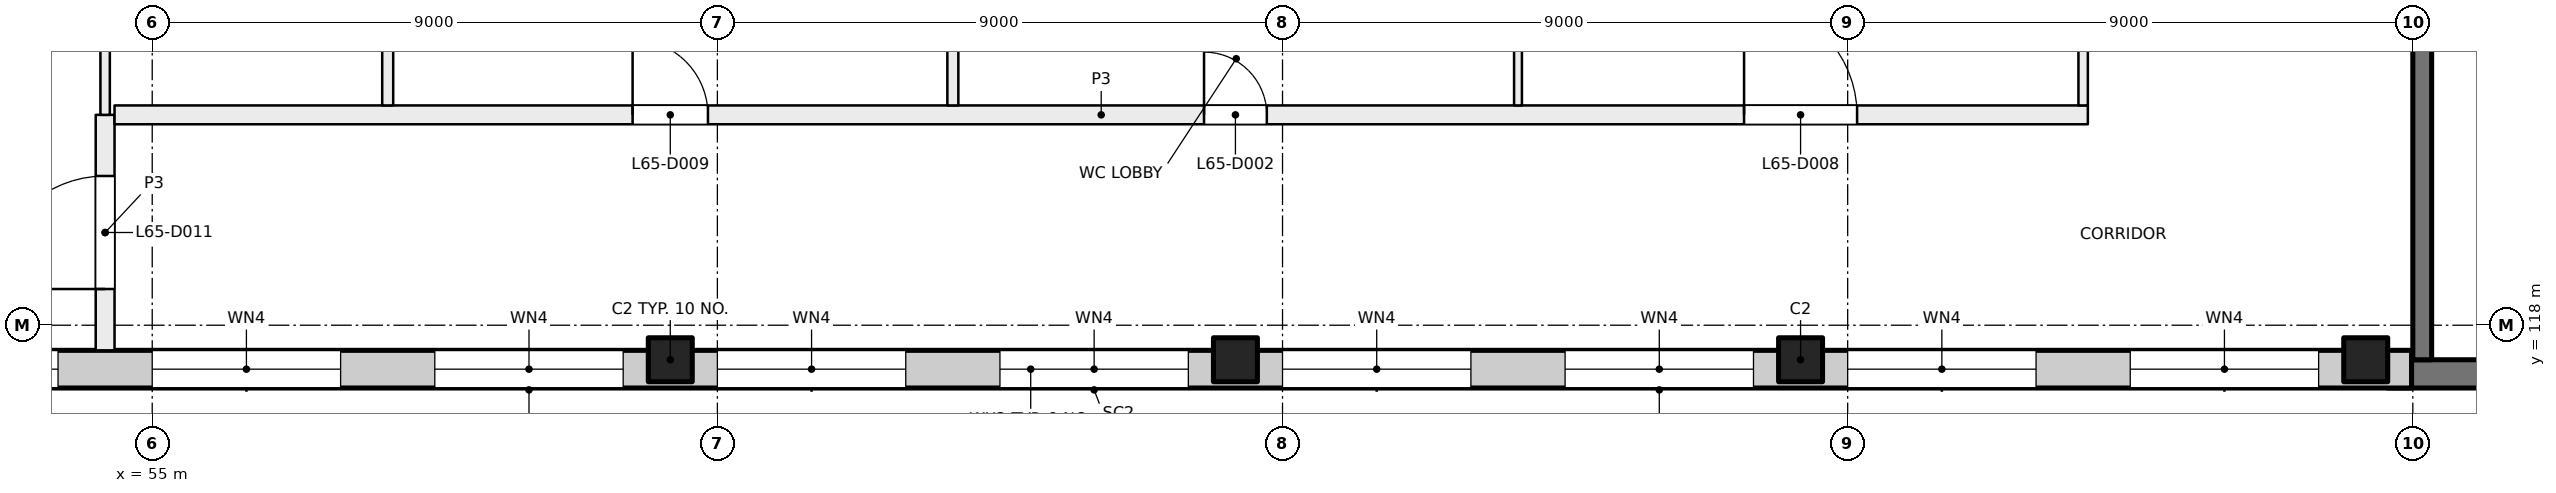
"""IFC4 building model, lengths in metres.
Left out: names, types, materials, properties, quantities, classifications, styles, units other than length and angle.
Written with IfcOpenShell. Run it as: python <this file> out.ifc"""

import sys

from ifc_helpers import new_model, si_unit, direction, frame, frame_2d, origin, origin_2d, place, context, subcontext, project, spatial, rectangle, extrude, element, fill, save


model = new_model("IFC4")
c1 = context("Model", 3, precision=1e-05, world=origin(), true_north=direction((0.0, 1.0)))
c2 = subcontext(c1, "Body", "Model", "MODEL_VIEW")
j1 = project(units=[si_unit("LENGTHUNIT", "METRE"), si_unit("PLANEANGLEUNIT", "RADIAN")], contexts=[c1])
p1 = place(None, origin())
s1 = spatial("IfcSite", under=j1, at=p1, CompositionType="ELEMENT")
p2 = place(p1, origin())
s2 = spatial("IfcBuilding", under=s1, at=p2, CompositionType="ELEMENT")
p3 = place(p2, frame((0.0, 0.0, 273.5)))
s3 = spatial("IfcBuildingStorey", under=s2, at=p3, CompositionType="ELEMENT", Elevation=273.5)
for number, where, z_axis, x_axis in (
    (1, (63.25, 117.45, 0.0), (0.0, 0.0, 1.0), (1.0, 0.0, 0.0)),
    (2, (72.25, 117.45, 0.0), (0.0, 0.0, 1.0), (1.0, 0.0, 0.0)),
    (3, (81.25, 117.45, 0.0), (0.0, 0.0, 1.0), (1.0, 0.0, 0.0)),
    (4, (90.25, 117.45, 0.0), (0.0, 0.0, 1.0), (1.0, 0.0, 0.0)),
):
    element("IfcColumn", number, at=place(p3, frame(where, z_axis=z_axis, x_axis=x_axis)), inside=s3, PredefinedType="COLUMN", context=c2, shape_type="SweptSolid", body=[
        extrude(rectangle(XDim=0.7, YDim=0.7, at=origin_2d()), origin(), (0.0, 0.0, 1.0), 4.0),
    ])
p4 = place(p3, frame((99.6, 117.225, 0.0), z_axis=(0.0, 0.0, 1.0), x_axis=(-1.0, 0.0, 0.0)))
e5 = element("IfcWall", 5, at=p4, inside=s3, PredefinedType="SHEAR", context=c2, shape_type="SweptSolid", body=[
    extrude(rectangle(XDim=9.0, YDim=0.45, at=frame_2d((4.5, 0.0))), origin(), (0.0, 0.0, 1.0), 4.0),
])
p5 = place(p3, frame((91.15, 126.2, 0.0), z_axis=(0.0, 0.0, 1.0), x_axis=(0.0, -1.0, 0.0)))
e6 = element("IfcWall", 6, at=p5, inside=s3, PredefinedType="SHEAR", context=c2, shape_type="SweptSolid", body=[
    extrude(rectangle(XDim=8.75, YDim=0.3, at=frame_2d((4.375, 0.0))), origin(), (0.0, 0.0, 1.0), 4.0),
])
p6 = place(p3, frame((90.98, 117.3, 0.0), z_axis=(0.0, 0.0, 1.0), x_axis=(-1.0, 0.0, 0.0)))
e7 = element("IfcWall", 7, at=p6, inside=s3, PredefinedType="SOLIDWALL", context=c2, shape_type="SweptSolid", body=[
    extrude(rectangle(XDim=43.98, YDim=0.6, at=frame_2d((21.99, 0.0))), origin(), (0.0, 0.0, 1.0), 3.625),
])
p7 = place(p6, frame((1.48, 0.0, 0.9)))
e8 = element("IfcOpeningElement", 8, at=p7, cuts=e7, PredefinedType="OPENING", context=c2, shape_type="SweptSolid", body=[
    extrude(rectangle(XDim=3.0, YDim=2.4, at=frame_2d((1.5, 1.2))), frame((0.0, 0.31, 0.0), z_axis=(0.0, -1.0, 0.0), x_axis=(1.0, 0.0, 0.0)), (0.0, 0.0, 1.0), 0.62),
])
p8 = place(p6, frame((5.98, 0.0, 0.9)))
e9 = element("IfcOpeningElement", 9, at=p8, cuts=e7, PredefinedType="OPENING", context=c2, shape_type="SweptSolid", body=[
    extrude(rectangle(XDim=3.0, YDim=2.4, at=frame_2d((1.5, 1.2))), frame((0.0, 0.31, 0.0), z_axis=(0.0, -1.0, 0.0), x_axis=(1.0, 0.0, 0.0)), (0.0, 0.0, 1.0), 0.62),
])
p9 = place(p6, frame((10.48, 0.0, 0.9)))
e10 = element("IfcOpeningElement", 10, at=p9, cuts=e7, PredefinedType="OPENING", context=c2, shape_type="SweptSolid", body=[
    extrude(rectangle(XDim=3.0, YDim=2.4, at=frame_2d((1.5, 1.2))), frame((0.0, 0.31, 0.0), z_axis=(0.0, -1.0, 0.0), x_axis=(1.0, 0.0, 0.0)), (0.0, 0.0, 1.0), 0.62),
])
p10 = place(p6, frame((14.98, 0.0, 0.9)))
e11 = element("IfcOpeningElement", 11, at=p10, cuts=e7, PredefinedType="OPENING", context=c2, shape_type="SweptSolid", body=[
    extrude(rectangle(XDim=3.0, YDim=2.4, at=frame_2d((1.5, 1.2))), frame((0.0, 0.31, 0.0), z_axis=(0.0, -1.0, 0.0), x_axis=(1.0, 0.0, 0.0)), (0.0, 0.0, 1.0), 0.62),
])
p11 = place(p6, frame((19.48, 0.0, 0.9)))
e12 = element("IfcOpeningElement", 12, at=p11, cuts=e7, PredefinedType="OPENING", context=c2, shape_type="SweptSolid", body=[
    extrude(rectangle(XDim=3.0, YDim=2.4, at=frame_2d((1.5, 1.2))), frame((0.0, 0.31, 0.0), z_axis=(0.0, -1.0, 0.0), x_axis=(1.0, 0.0, 0.0)), (0.0, 0.0, 1.0), 0.62),
])
p12 = place(p6, frame((23.98, 0.0, 0.9)))
e13 = element("IfcOpeningElement", 13, at=p12, cuts=e7, PredefinedType="OPENING", context=c2, shape_type="SweptSolid", body=[
    extrude(rectangle(XDim=3.0, YDim=2.4, at=frame_2d((1.5, 1.2))), frame((0.0, 0.31, 0.0), z_axis=(0.0, -1.0, 0.0), x_axis=(1.0, 0.0, 0.0)), (0.0, 0.0, 1.0), 0.62),
])
p13 = place(p6, frame((28.48, 0.0, 0.9)))
e14 = element("IfcOpeningElement", 14, at=p13, cuts=e7, PredefinedType="OPENING", context=c2, shape_type="SweptSolid", body=[
    extrude(rectangle(XDim=3.0, YDim=2.4, at=frame_2d((1.5, 1.2))), frame((0.0, 0.31, 0.0), z_axis=(0.0, -1.0, 0.0), x_axis=(1.0, 0.0, 0.0)), (0.0, 0.0, 1.0), 0.62),
])
p14 = place(p6, frame((32.98, 0.0, 0.9)))
e15 = element("IfcOpeningElement", 15, at=p14, cuts=e7, PredefinedType="OPENING", context=c2, shape_type="SweptSolid", body=[
    extrude(rectangle(XDim=3.0, YDim=2.4, at=frame_2d((1.5, 1.2))), frame((0.0, 0.31, 0.0), z_axis=(0.0, -1.0, 0.0), x_axis=(1.0, 0.0, 0.0)), (0.0, 0.0, 1.0), 0.62),
])
p15 = place(p6, frame((37.48, 0.0, 0.9)))
e16 = element("IfcOpeningElement", 16, at=p15, cuts=e7, PredefinedType="OPENING", context=c2, shape_type="SweptSolid", body=[
    extrude(rectangle(XDim=3.0, YDim=2.4, at=frame_2d((1.5, 1.2))), frame((0.0, 0.31, 0.0), z_axis=(0.0, -1.0, 0.0), x_axis=(1.0, 0.0, 0.0)), (0.0, 0.0, 1.0), 0.62),
])
p16 = place(p3, frame((54.25, 117.6, 0.0), z_axis=(0.0, 0.0, 1.0), x_axis=(0.0, 1.0, 0.0)))
e17 = element("IfcWall", 17, at=p16, inside=s3, PredefinedType="PARTITIONING", context=c2, shape_type="SweptSolid", body=[
    extrude(rectangle(XDim=3.75, YDim=0.3, at=frame_2d((1.875, 0.0))), origin(), (0.0, 0.0, 1.0), 3.625),
])
p17 = place(p16, frame((0.977, 0.0, 0.0)))
e18 = element("IfcOpeningElement", 18, at=p17, cuts=e17, PredefinedType="OPENING", context=c2, shape_type="SweptSolid", body=[
    extrude(rectangle(XDim=1.8, YDim=2.1, at=frame_2d((0.9, 1.05))), frame((0.0, 0.16, 0.0), z_axis=(0.0, -1.0, 0.0), x_axis=(1.0, 0.0, 0.0)), (0.0, 0.0, 1.0), 0.32),
])
p18 = place(p3, frame((54.4, 121.35, 0.0), z_axis=(0.0, 0.0, 1.0), x_axis=(1.0, 0.0, 0.0)))
e19 = element("IfcWall", 19, at=p18, inside=s3, PredefinedType="PARTITIONING", context=c2, shape_type="SweptSolid", body=[
    extrude(rectangle(XDim=31.425, YDim=0.3, at=frame_2d((15.712, 0.0))), origin(), (0.0, 0.0, 1.0), 3.625),
])
p19 = place(p18, frame((17.35, 0.0, 0.0)))
e20 = element("IfcOpeningElement", 20, at=p19, cuts=e19, PredefinedType="OPENING", context=c2, shape_type="SweptSolid", body=[
    extrude(rectangle(XDim=1.0, YDim=2.1, at=frame_2d((0.5, 1.05))), frame((0.0, 0.16, 0.0), z_axis=(0.0, -1.0, 0.0), x_axis=(1.0, 0.0, 0.0)), (0.0, 0.0, 1.0), 0.32),
])
p20 = place(p18, frame((25.95, 0.0, 0.0)))
e21 = element("IfcOpeningElement", 21, at=p20, cuts=e19, PredefinedType="OPENING", context=c2, shape_type="SweptSolid", body=[
    extrude(rectangle(XDim=1.8, YDim=2.1, at=frame_2d((0.9, 1.05))), frame((0.0, 0.16, 0.0), z_axis=(0.0, -1.0, 0.0), x_axis=(1.0, 0.0, 0.0)), (0.0, 0.0, 1.0), 0.32),
])
p21 = place(p18, frame((8.25, 0.0, 0.0)))
e22 = element("IfcOpeningElement", 22, at=p21, cuts=e19, PredefinedType="OPENING", context=c2, shape_type="SweptSolid", body=[
    extrude(rectangle(XDim=1.2, YDim=2.1, at=frame_2d((0.6, 1.05))), frame((0.0, 0.16, 0.0), z_axis=(0.0, -1.0, 0.0), x_axis=(1.0, 0.0, 0.0)), (0.0, 0.0, 1.0), 0.32),
])
p22 = place(p3, frame((54.25, 134.0, 0.0), z_axis=(0.0, 0.0, 1.0), x_axis=(0.0, -1.0, 0.0)))
e23 = element("IfcWall", 23, at=p22, inside=s3, PredefinedType="PARTITIONING", context=c2, shape_type="SweptSolid", body=[
    extrude(rectangle(XDim=12.65, YDim=0.15, at=frame_2d((6.325, 0.0))), origin(), (0.0, 0.0, 1.0), 3.625),
])
p23 = place(p22, frame((5.425, 0.0, 0.0)))
e24 = element("IfcOpeningElement", 24, at=p23, cuts=e23, PredefinedType="OPENING", context=c2, shape_type="SweptSolid", body=[
    extrude(rectangle(XDim=1.8, YDim=2.1, at=frame_2d((0.9, 1.05))), frame((0.0, 0.085, 0.0), z_axis=(0.0, -1.0, 0.0), x_axis=(1.0, 0.0, 0.0)), (0.0, 0.0, 1.0), 0.17),
])
p24 = place(p3, frame((58.75, 125.912, 0.0), z_axis=(0.0, 0.0, 1.0), x_axis=(0.0, -1.0, 0.0)))
e25 = element("IfcWall", 25, at=p24, inside=s3, PredefinedType="PARTITIONING", context=c2, shape_type="SweptSolid", body=[
    extrude(rectangle(XDim=4.412, YDim=0.175, at=frame_2d((2.206, 0.0))), origin(), (0.0, 0.0, 1.0), 3.625),
])
p25 = place(p3, frame((67.75, 121.5, 0.0), z_axis=(0.0, 0.0, 1.0), x_axis=(0.0, 1.0, 0.0)))
e26 = element("IfcWall", 26, at=p25, inside=s3, PredefinedType="PARTITIONING", context=c2, shape_type="SweptSolid", body=[
    extrude(rectangle(XDim=8.4, YDim=0.175, at=frame_2d((4.2, 0.0))), origin(), (0.0, 0.0, 1.0), 3.625),
])
p26 = place(p3, frame((76.75, 125.938, 0.0), z_axis=(0.0, 0.0, 1.0), x_axis=(0.0, -1.0, 0.0)))
e27 = element("IfcWall", 27, at=p26, inside=s3, PredefinedType="PARTITIONING", context=c2, shape_type="SweptSolid", body=[
    extrude(rectangle(XDim=4.438, YDim=0.125, at=frame_2d((2.219, 0.0))), origin(), (0.0, 0.0, 1.0), 3.625),
])
p27 = place(p3, frame((85.75, 121.5, 0.0), z_axis=(0.0, 0.0, 1.0), x_axis=(0.0, 1.0, 0.0)))
e28 = element("IfcWall", 28, at=p27, inside=s3, PredefinedType="PARTITIONING", context=c2, shape_type="SweptSolid", body=[
    extrude(rectangle(XDim=8.45, YDim=0.15, at=frame_2d((4.225, 0.0))), origin(), (0.0, 0.0, 1.0), 3.625),
])
p28 = place(p7, origin())
e29 = element("IfcWindow", 29, at=p28, inside=s3, PartitioningType="SINGLE_PANEL", PredefinedType="WINDOW", context=c2, shape_type="SweptSolid", body=[
    extrude(rectangle(XDim=3.0, YDim=2.4, at=frame_2d((1.5, 1.2))), frame((0.0, 0.03, 0.0), z_axis=(0.0, -1.0, 0.0), x_axis=(1.0, 0.0, 0.0)), (0.0, 0.0, 1.0), 0.06),
])
fill(e8, e29)
p29 = place(p8, origin())
e30 = element("IfcWindow", 30, at=p29, inside=s3, PartitioningType="SINGLE_PANEL", PredefinedType="WINDOW", context=c2, shape_type="SweptSolid", body=[
    extrude(rectangle(XDim=3.0, YDim=2.4, at=frame_2d((1.5, 1.2))), frame((0.0, 0.03, 0.0), z_axis=(0.0, -1.0, 0.0), x_axis=(1.0, 0.0, 0.0)), (0.0, 0.0, 1.0), 0.06),
])
fill(e9, e30)
p30 = place(p9, origin())
e31 = element("IfcWindow", 31, at=p30, inside=s3, PartitioningType="SINGLE_PANEL", PredefinedType="WINDOW", context=c2, shape_type="SweptSolid", body=[
    extrude(rectangle(XDim=3.0, YDim=2.4, at=frame_2d((1.5, 1.2))), frame((0.0, 0.03, 0.0), z_axis=(0.0, -1.0, 0.0), x_axis=(1.0, 0.0, 0.0)), (0.0, 0.0, 1.0), 0.06),
])
fill(e10, e31)
p31 = place(p10, origin())
e32 = element("IfcWindow", 32, at=p31, inside=s3, PartitioningType="SINGLE_PANEL", PredefinedType="WINDOW", context=c2, shape_type="SweptSolid", body=[
    extrude(rectangle(XDim=3.0, YDim=2.4, at=frame_2d((1.5, 1.2))), frame((0.0, 0.03, 0.0), z_axis=(0.0, -1.0, 0.0), x_axis=(1.0, 0.0, 0.0)), (0.0, 0.0, 1.0), 0.06),
])
fill(e11, e32)
p32 = place(p11, origin())
e33 = element("IfcWindow", 33, at=p32, inside=s3, PartitioningType="SINGLE_PANEL", PredefinedType="WINDOW", context=c2, shape_type="SweptSolid", body=[
    extrude(rectangle(XDim=3.0, YDim=2.4, at=frame_2d((1.5, 1.2))), frame((0.0, 0.03, 0.0), z_axis=(0.0, -1.0, 0.0), x_axis=(1.0, 0.0, 0.0)), (0.0, 0.0, 1.0), 0.06),
])
fill(e12, e33)
p33 = place(p12, origin())
e34 = element("IfcWindow", 34, at=p33, inside=s3, PartitioningType="SINGLE_PANEL", PredefinedType="WINDOW", context=c2, shape_type="SweptSolid", body=[
    extrude(rectangle(XDim=3.0, YDim=2.4, at=frame_2d((1.5, 1.2))), frame((0.0, 0.03, 0.0), z_axis=(0.0, -1.0, 0.0), x_axis=(1.0, 0.0, 0.0)), (0.0, 0.0, 1.0), 0.06),
])
fill(e13, e34)
p34 = place(p13, origin())
e35 = element("IfcWindow", 35, at=p34, inside=s3, PartitioningType="SINGLE_PANEL", PredefinedType="WINDOW", context=c2, shape_type="SweptSolid", body=[
    extrude(rectangle(XDim=3.0, YDim=2.4, at=frame_2d((1.5, 1.2))), frame((0.0, 0.03, 0.0), z_axis=(0.0, -1.0, 0.0), x_axis=(1.0, 0.0, 0.0)), (0.0, 0.0, 1.0), 0.06),
])
fill(e14, e35)
p35 = place(p14, origin())
e36 = element("IfcWindow", 36, at=p35, inside=s3, PartitioningType="SINGLE_PANEL", PredefinedType="WINDOW", context=c2, shape_type="SweptSolid", body=[
    extrude(rectangle(XDim=3.0, YDim=2.4, at=frame_2d((1.5, 1.2))), frame((0.0, 0.03, 0.0), z_axis=(0.0, -1.0, 0.0), x_axis=(1.0, 0.0, 0.0)), (0.0, 0.0, 1.0), 0.06),
])
fill(e15, e36)
p36 = place(p15, origin())
e37 = element("IfcWindow", 37, at=p36, inside=s3, PartitioningType="SINGLE_PANEL", PredefinedType="WINDOW", context=c2, shape_type="SweptSolid", body=[
    extrude(rectangle(XDim=3.0, YDim=2.4, at=frame_2d((1.5, 1.2))), frame((0.0, 0.03, 0.0), z_axis=(0.0, -1.0, 0.0), x_axis=(1.0, 0.0, 0.0)), (0.0, 0.0, 1.0), 0.06),
])
fill(e16, e37)
p37 = place(p19, origin())
e38 = element("IfcDoor", 38, at=p37, inside=s3, OperationType="SINGLE_SWING_LEFT", PredefinedType="DOOR", context=c2, shape_type="SweptSolid", body=[
    extrude(rectangle(XDim=1.0, YDim=2.1, at=frame_2d((0.5, 1.05))), frame((0.0, 0.025, 0.0), z_axis=(0.0, -1.0, 0.0), x_axis=(1.0, 0.0, 0.0)), (0.0, 0.0, 1.0), 0.05),
])
fill(e20, e38)
p38 = place(p20, origin())
e39 = element("IfcDoor", 39, at=p38, inside=s3, OperationType="DOUBLE_DOOR_SINGLE_SWING", PredefinedType="DOOR", context=c2, shape_type="SweptSolid", body=[
    extrude(rectangle(XDim=1.8, YDim=2.1, at=frame_2d((0.9, 1.05))), frame((0.0, 0.025, 0.0), z_axis=(0.0, -1.0, 0.0), x_axis=(1.0, 0.0, 0.0)), (0.0, 0.0, 1.0), 0.05),
])
fill(e21, e39)
p39 = place(p21, origin())
e40 = element("IfcDoor", 40, at=p39, inside=s3, OperationType="DOUBLE_DOOR_SINGLE_SWING", PredefinedType="DOOR", context=c2, shape_type="SweptSolid", body=[
    extrude(rectangle(XDim=1.2, YDim=2.1, at=frame_2d((0.6, 1.05))), frame((0.0, 0.025, 0.0), z_axis=(0.0, -1.0, 0.0), x_axis=(1.0, 0.0, 0.0)), (0.0, 0.0, 1.0), 0.05),
])
fill(e22, e40)
p40 = place(p17, origin())
e41 = element("IfcDoor", 41, at=p40, inside=s3, OperationType="DOUBLE_DOOR_SINGLE_SWING", PredefinedType="DOOR", context=c2, shape_type="SweptSolid", body=[
    extrude(rectangle(XDim=1.8, YDim=2.1, at=frame_2d((0.9, 1.05))), frame((0.0, 0.025, 0.0), z_axis=(0.0, -1.0, 0.0), x_axis=(1.0, 0.0, 0.0)), (0.0, 0.0, 1.0), 0.05),
])
fill(e18, e41)
save(model, sys.argv[1])
